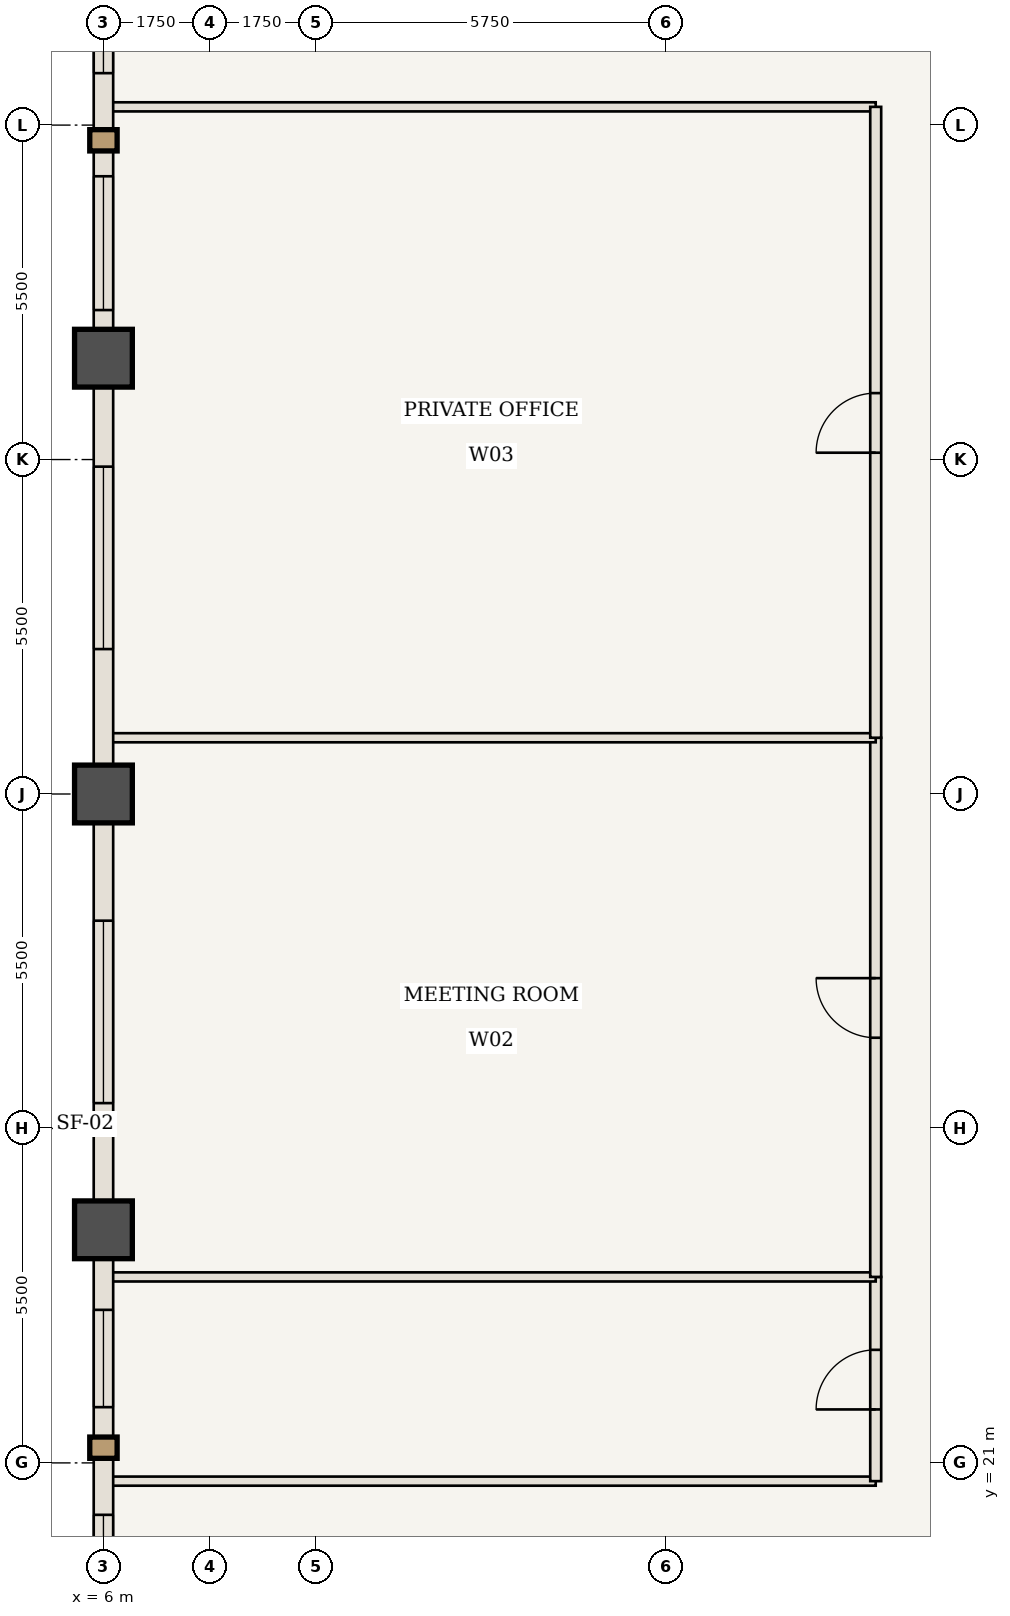
"""IFC4 building model, lengths in metres.
Left out: names, types, materials, properties, quantities, classifications, styles, units other than length and angle.
Written with IfcOpenShell. Run it as: python <this file> out.ifc"""

import sys

from ifc_helpers import new_model, si_unit, direction, frame, frame_2d, origin, origin_2d, place, context, subcontext, project, spatial, rectangle, extrude, element, fill, save


model = new_model("IFC4")
c1 = context("Model", 3, precision=1e-05, world=origin(), true_north=direction((0.0, 1.0)))
c2 = subcontext(c1, "Body", "Model", "MODEL_VIEW")
j1 = project(units=[si_unit("LENGTHUNIT", "METRE"), si_unit("PLANEANGLEUNIT", "RADIAN")], contexts=[c1])
p1 = place(None, origin())
s1 = spatial("IfcSite", under=j1, at=p1, CompositionType="ELEMENT")
p2 = place(p1, origin())
s2 = spatial("IfcBuilding", under=s1, at=p2, CompositionType="ELEMENT")
p3 = place(p2, frame((0.0, 0.0, 133.7)))
s3 = spatial("IfcBuildingStorey", under=s2, at=p3, CompositionType="ELEMENT", Elevation=133.7)
for number, where, z_axis, x_axis in (
    (1, (6.0, 24.833, 0.0), (0.0, 0.0, 1.0), (1.0, 0.0, 0.0)),
    (2, (6.0, 32.0, 0.0), (0.0, 0.0, 1.0), (1.0, 0.0, 0.0)),
    (3, (6.0, 39.167, 0.0), (0.0, 0.0, 1.0), (1.0, 0.0, 0.0)),
):
    element("IfcColumn", number, at=place(p3, frame(where, z_axis=z_axis, x_axis=x_axis)), inside=s3, PredefinedType="COLUMN", context=c2, shape_type="SweptSolid", body=[
        extrude(rectangle(XDim=0.95, YDim=0.95, at=origin_2d()), origin(), (0.0, 0.0, 1.0), 3.85),
    ])
for number, where, z_axis, x_axis in (
    (4, (6.06, 20.7, 0.0), (0.0, 0.0, 1.0), (1.0, 0.0, 0.0)),
    (5, (6.06, 43.3, 0.0), (0.0, 0.0, 1.0), (1.0, 0.0, 0.0)),
):
    element("IfcWall", number, at=place(p3, frame(where, z_axis=z_axis, x_axis=x_axis)), inside=s3, PredefinedType="STANDARD", context=c2, shape_type="SweptSolid", body=[
        extrude(rectangle(XDim=12.64, YDim=0.15, at=frame_2d((6.32, 0.0))), origin(), (0.0, 0.0, 1.0), 3.065),
    ])
p4 = place(p3, frame((18.7, 20.7, 0.0), z_axis=(0.0, 0.0, 1.0), x_axis=(0.0, 1.0, 0.0)))
e6 = element("IfcWall", 6, at=p4, inside=s3, PredefinedType="STANDARD", context=c2, shape_type="SweptSolid", body=[
    extrude(rectangle(XDim=3.358, YDim=0.18, at=frame_2d((1.679, 0.0))), origin(), (0.0, 0.0, 1.0), 3.685),
])
p5 = place(p4, frame((1.179, 0.0, 0.0)))
e7 = element("IfcOpeningElement", 7, at=p5, cuts=e6, PredefinedType="OPENING", context=c2, shape_type="SweptSolid", body=[
    extrude(rectangle(XDim=0.98, YDim=2.2, at=frame_2d((0.49, 1.1))), frame((0.0, 0.1, 0.0), z_axis=(0.0, -1.0, 0.0), x_axis=(1.0, 0.0, 0.0)), (0.0, 0.0, 1.0), 0.2),
])
p6 = place(p3, frame((6.06, 24.058, 0.0), z_axis=(0.0, 0.0, 1.0), x_axis=(1.0, 0.0, 0.0)))
e8 = element("IfcWall", 8, at=p6, inside=s3, PredefinedType="STANDARD", context=c2, shape_type="SweptSolid", body=[
    extrude(rectangle(XDim=12.64, YDim=0.15, at=frame_2d((6.32, 0.0))), origin(), (0.0, 0.0, 1.0), 3.685),
])
p7 = place(p3, frame((18.7, 24.058, 0.0), z_axis=(0.0, 0.0, 1.0), x_axis=(0.0, 1.0, 0.0)))
e9 = element("IfcWall", 9, at=p7, inside=s3, PredefinedType="STANDARD", context=c2, shape_type="SweptSolid", body=[
    extrude(rectangle(XDim=8.867, YDim=0.18, at=frame_2d((4.433, 0.0))), origin(), (0.0, 0.0, 1.0), 3.685),
])
p8 = place(p7, frame((3.933, 0.0, 0.0)))
e10 = element("IfcOpeningElement", 10, at=p8, cuts=e9, PredefinedType="OPENING", context=c2, shape_type="SweptSolid", body=[
    extrude(rectangle(XDim=0.98, YDim=2.2, at=frame_2d((0.49, 1.1))), frame((0.0, 0.1, 0.0), z_axis=(0.0, -1.0, 0.0), x_axis=(1.0, 0.0, 0.0)), (0.0, 0.0, 1.0), 0.2),
])
p9 = place(p3, frame((6.06, 32.925, 0.0), z_axis=(0.0, 0.0, 1.0), x_axis=(1.0, 0.0, 0.0)))
e11 = element("IfcWall", 11, at=p9, inside=s3, PredefinedType="STANDARD", context=c2, shape_type="SweptSolid", body=[
    extrude(rectangle(XDim=12.64, YDim=0.15, at=frame_2d((6.32, 0.0))), origin(), (0.0, 0.0, 1.0), 3.685),
])
p10 = place(p3, frame((18.7, 32.925, 0.0), z_axis=(0.0, 0.0, 1.0), x_axis=(0.0, 1.0, 0.0)))
e12 = element("IfcWall", 12, at=p10, inside=s3, PredefinedType="STANDARD", context=c2, shape_type="SweptSolid", body=[
    extrude(rectangle(XDim=10.375, YDim=0.18, at=frame_2d((5.188, 0.0))), origin(), (0.0, 0.0, 1.0), 3.685),
])
p11 = place(p10, frame((4.688, 0.0, 0.0)))
e13 = element("IfcOpeningElement", 13, at=p11, cuts=e12, PredefinedType="OPENING", context=c2, shape_type="SweptSolid", body=[
    extrude(rectangle(XDim=0.98, YDim=2.2, at=frame_2d((0.49, 1.1))), frame((0.0, 0.1, 0.0), z_axis=(0.0, -1.0, 0.0), x_axis=(1.0, 0.0, 0.0)), (0.0, 0.0, 1.0), 0.2),
])
p12 = place(p3, frame((6.0, 17.667, 0.0), z_axis=(0.0, 0.0, 1.0), x_axis=(0.0, 1.0, 0.0)))
e14 = element("IfcWall", 14, at=p12, inside=s3, PredefinedType="USERDEFINED", context=c2, shape_type="SweptSolid", body=[
    extrude(rectangle(XDim=7.167, YDim=0.32, at=frame_2d((3.583, 0.0))), origin(), (0.0, 0.0, 1.0), 2.885),
])
p13 = place(p12, frame((0.879, 0.0, 0.85)))
e15 = element("IfcOpeningElement", 15, at=p13, cuts=e14, PredefinedType="OPENING", context=c2, shape_type="SweptSolid", body=[
    extrude(rectangle(XDim=1.6, YDim=1.835, at=frame_2d((0.8, 0.917))), frame((0.0, 0.17, 0.0), z_axis=(0.0, -1.0, 0.0), x_axis=(1.0, 0.0, 0.0)), (0.0, 0.0, 1.0), 0.34),
])
p14 = place(p12, frame((4.25, 0.0, 0.85)))
e16 = element("IfcOpeningElement", 16, at=p14, cuts=e14, PredefinedType="OPENING", context=c2, shape_type="SweptSolid", body=[
    extrude(rectangle(XDim=1.6, YDim=1.835, at=frame_2d((0.8, 0.917))), frame((0.0, 0.17, 0.0), z_axis=(0.0, -1.0, 0.0), x_axis=(1.0, 0.0, 0.0)), (0.0, 0.0, 1.0), 0.34),
])
p15 = place(p3, frame((6.0, 24.833, 0.0), z_axis=(0.0, 0.0, 1.0), x_axis=(0.0, 1.0, 0.0)))
e17 = element("IfcWall", 17, at=p15, inside=s3, PredefinedType="USERDEFINED", context=c2, shape_type="SweptSolid", body=[
    extrude(rectangle(XDim=7.167, YDim=0.32, at=frame_2d((3.583, 0.0))), origin(), (0.0, 0.0, 1.0), 2.885),
])
p16 = place(p15, frame((2.083, 0.0, 0.85)))
e18 = element("IfcOpeningElement", 18, at=p16, cuts=e17, PredefinedType="OPENING", context=c2, shape_type="SweptSolid", body=[
    extrude(rectangle(XDim=3.0, YDim=1.835, at=frame_2d((1.5, 0.917))), frame((0.0, 0.17, 0.0), z_axis=(0.0, -1.0, 0.0), x_axis=(1.0, 0.0, 0.0)), (0.0, 0.0, 1.0), 0.34),
])
p17 = place(p3, frame((6.0, 32.0, 0.0), z_axis=(0.0, 0.0, 1.0), x_axis=(0.0, 1.0, 0.0)))
e19 = element("IfcWall", 19, at=p17, inside=s3, PredefinedType="USERDEFINED", context=c2, shape_type="SweptSolid", body=[
    extrude(rectangle(XDim=7.167, YDim=0.32, at=frame_2d((3.583, 0.0))), origin(), (0.0, 0.0, 1.0), 2.885),
])
p18 = place(p17, frame((2.383, 0.0, 0.85)))
e20 = element("IfcOpeningElement", 20, at=p18, cuts=e19, PredefinedType="OPENING", context=c2, shape_type="SweptSolid", body=[
    extrude(rectangle(XDim=3.0, YDim=1.835, at=frame_2d((1.5, 0.917))), frame((0.0, 0.17, 0.0), z_axis=(0.0, -1.0, 0.0), x_axis=(1.0, 0.0, 0.0)), (0.0, 0.0, 1.0), 0.34),
])
p19 = place(p3, frame((6.0, 39.167, 0.0), z_axis=(0.0, 0.0, 1.0), x_axis=(0.0, 1.0, 0.0)))
e21 = element("IfcWall", 21, at=p19, inside=s3, PredefinedType="USERDEFINED", context=c2, shape_type="SweptSolid", body=[
    extrude(rectangle(XDim=7.167, YDim=0.32, at=frame_2d((3.583, 0.0))), origin(), (0.0, 0.0, 1.0), 2.885),
])
p20 = place(p19, frame((0.792, 0.0, 0.85)))
e22 = element("IfcOpeningElement", 22, at=p20, cuts=e21, PredefinedType="OPENING", context=c2, shape_type="SweptSolid", body=[
    extrude(rectangle(XDim=2.2, YDim=1.835, at=frame_2d((1.1, 0.917))), frame((0.0, 0.17, 0.0), z_axis=(0.0, -1.0, 0.0), x_axis=(1.0, 0.0, 0.0)), (0.0, 0.0, 1.0), 0.34),
])
p21 = place(p19, frame((4.688, 0.0, 0.85)))
e23 = element("IfcOpeningElement", 23, at=p21, cuts=e21, PredefinedType="OPENING", context=c2, shape_type="SweptSolid", body=[
    extrude(rectangle(XDim=1.6, YDim=1.835, at=frame_2d((0.8, 0.917))), frame((0.0, 0.17, 0.0), z_axis=(0.0, -1.0, 0.0), x_axis=(1.0, 0.0, 0.0)), (0.0, 0.0, 1.0), 0.34),
])
p22 = place(p5, origin())
e24 = element("IfcDoor", 24, at=p22, inside=s3, OperationType="SINGLE_SWING_LEFT", PredefinedType="DOOR", context=c2, shape_type="SweptSolid", body=[
    extrude(rectangle(XDim=0.98, YDim=2.2, at=frame_2d((0.49, 1.1))), frame((0.0, 0.025, 0.0), z_axis=(0.0, -1.0, 0.0), x_axis=(1.0, 0.0, 0.0)), (0.0, 0.0, 1.0), 0.05),
])
fill(e7, e24)
p23 = place(p8, origin())
e25 = element("IfcDoor", 25, at=p23, inside=s3, OperationType="SINGLE_SWING_RIGHT", PredefinedType="DOOR", context=c2, shape_type="SweptSolid", body=[
    extrude(rectangle(XDim=0.98, YDim=2.2, at=frame_2d((0.49, 1.1))), frame((0.0, 0.025, 0.0), z_axis=(0.0, -1.0, 0.0), x_axis=(1.0, 0.0, 0.0)), (0.0, 0.0, 1.0), 0.05),
])
fill(e10, e25)
p24 = place(p11, origin())
e26 = element("IfcDoor", 26, at=p24, inside=s3, OperationType="SINGLE_SWING_LEFT", PredefinedType="DOOR", context=c2, shape_type="SweptSolid", body=[
    extrude(rectangle(XDim=0.98, YDim=2.2, at=frame_2d((0.49, 1.1))), frame((0.0, 0.025, 0.0), z_axis=(0.0, -1.0, 0.0), x_axis=(1.0, 0.0, 0.0)), (0.0, 0.0, 1.0), 0.05),
])
fill(e13, e26)
p25 = place(p13, origin())
e27 = element("IfcWindow", 27, at=p25, inside=s3, PartitioningType="SINGLE_PANEL", PredefinedType="WINDOW", context=c2, shape_type="SweptSolid", body=[
    extrude(rectangle(XDim=1.6, YDim=1.835, at=frame_2d((0.8, 0.917))), frame((0.0, 0.03, 0.0), z_axis=(0.0, -1.0, 0.0), x_axis=(1.0, 0.0, 0.0)), (0.0, 0.0, 1.0), 0.06),
])
fill(e15, e27)
p26 = place(p14, origin())
e28 = element("IfcWindow", 28, at=p26, inside=s3, PartitioningType="SINGLE_PANEL", PredefinedType="WINDOW", context=c2, shape_type="SweptSolid", body=[
    extrude(rectangle(XDim=1.6, YDim=1.835, at=frame_2d((0.8, 0.917))), frame((0.0, 0.03, 0.0), z_axis=(0.0, -1.0, 0.0), x_axis=(1.0, 0.0, 0.0)), (0.0, 0.0, 1.0), 0.06),
])
fill(e16, e28)
p27 = place(p16, origin())
e29 = element("IfcWindow", 29, at=p27, inside=s3, PartitioningType="SINGLE_PANEL", PredefinedType="WINDOW", context=c2, shape_type="SweptSolid", body=[
    extrude(rectangle(XDim=3.0, YDim=1.835, at=frame_2d((1.5, 0.917))), frame((0.0, 0.03, 0.0), z_axis=(0.0, -1.0, 0.0), x_axis=(1.0, 0.0, 0.0)), (0.0, 0.0, 1.0), 0.06),
])
fill(e18, e29)
p28 = place(p18, origin())
e30 = element("IfcWindow", 30, at=p28, inside=s3, PartitioningType="SINGLE_PANEL", PredefinedType="WINDOW", context=c2, shape_type="SweptSolid", body=[
    extrude(rectangle(XDim=3.0, YDim=1.835, at=frame_2d((1.5, 0.917))), frame((0.0, 0.03, 0.0), z_axis=(0.0, -1.0, 0.0), x_axis=(1.0, 0.0, 0.0)), (0.0, 0.0, 1.0), 0.06),
])
fill(e20, e30)
p29 = place(p20, origin())
e31 = element("IfcWindow", 31, at=p29, inside=s3, PartitioningType="SINGLE_PANEL", PredefinedType="WINDOW", context=c2, shape_type="SweptSolid", body=[
    extrude(rectangle(XDim=2.2, YDim=1.835, at=frame_2d((1.1, 0.917))), frame((0.0, 0.03, 0.0), z_axis=(0.0, -1.0, 0.0), x_axis=(1.0, 0.0, 0.0)), (0.0, 0.0, 1.0), 0.06),
])
fill(e22, e31)
p30 = place(p21, origin())
e32 = element("IfcWindow", 32, at=p30, inside=s3, PartitioningType="SINGLE_PANEL", PredefinedType="WINDOW", context=c2, shape_type="SweptSolid", body=[
    extrude(rectangle(XDim=1.6, YDim=1.835, at=frame_2d((0.8, 0.917))), frame((0.0, 0.03, 0.0), z_axis=(0.0, -1.0, 0.0), x_axis=(1.0, 0.0, 0.0)), (0.0, 0.0, 1.0), 0.06),
])
fill(e23, e32)
save(model, sys.argv[1])
